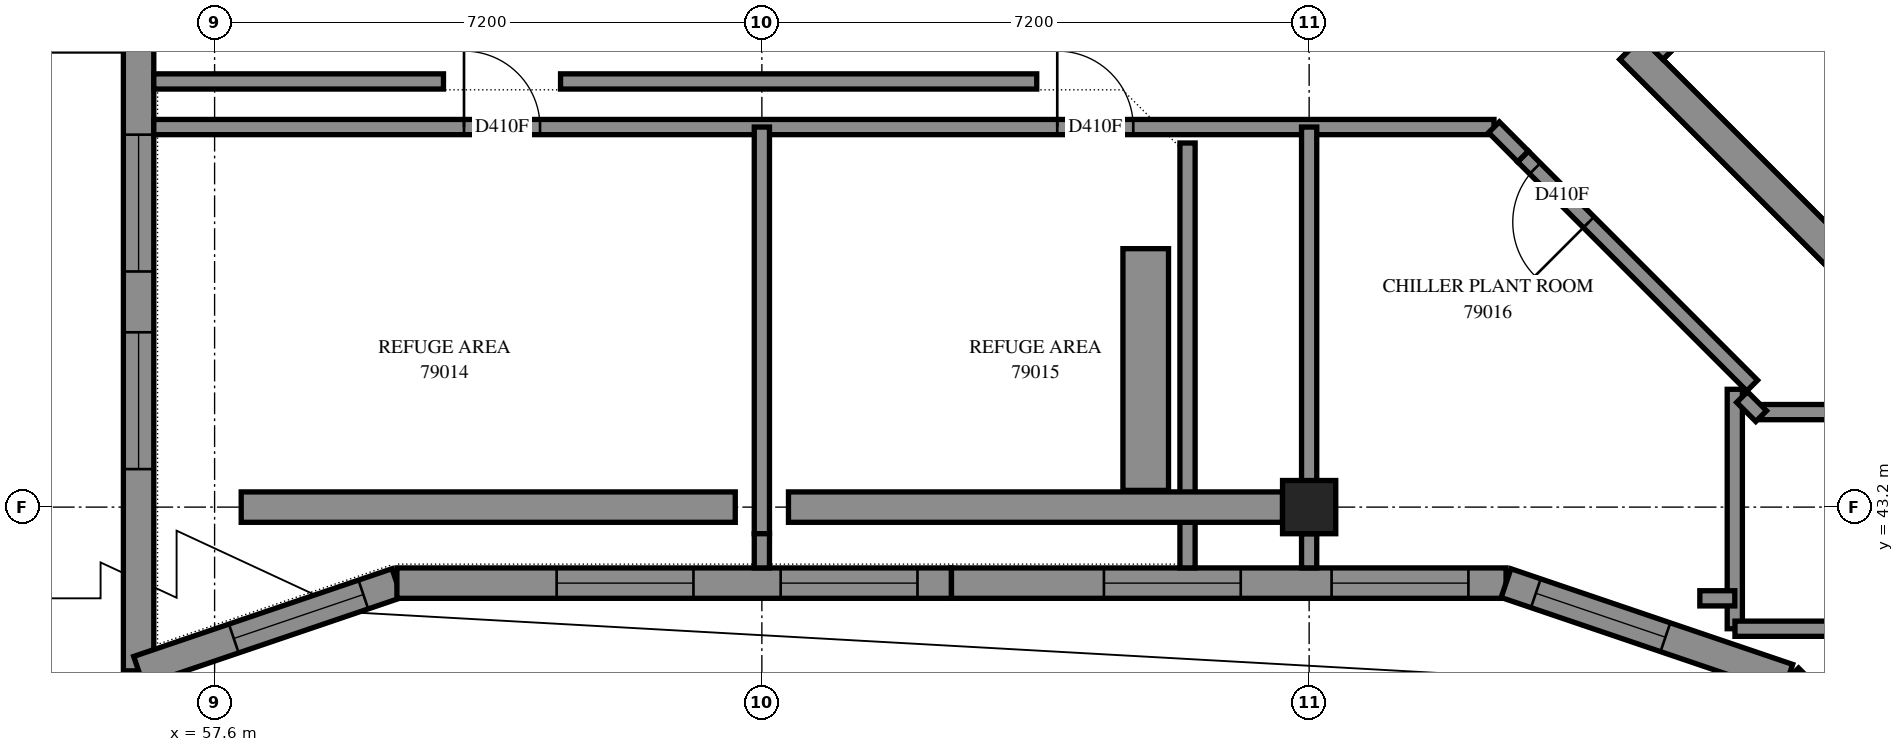
"""IFC4 building model, lengths in metres.
Left out: names, types, materials, properties, quantities, classifications, styles, units other than length and angle.
Written with IfcOpenShell. Run it as: python <this file> out.ifc"""

import sys

from ifc_helpers import new_model, si_unit, direction, frame, frame_2d, origin, origin_2d, place, context, subcontext, project, spatial, polyline, rectangle, outline, extrude, element, fill, save


model = new_model("IFC4")
c1 = context("Model", 3, precision=1e-05, world=origin(), true_north=direction((0.0, 1.0)))
c2 = subcontext(c1, "Body", "Model", "MODEL_VIEW")
j1 = project(units=[si_unit("LENGTHUNIT", "METRE"), si_unit("PLANEANGLEUNIT", "RADIAN")], contexts=[c1])
p1 = place(None, origin())
s1 = spatial("IfcSite", under=j1, at=p1, CompositionType="ELEMENT")
p2 = place(p1, origin())
s2 = spatial("IfcBuilding", under=s1, at=p2, CompositionType="ELEMENT")
p3 = place(p2, frame((0.0, 0.0, 290.6)))
s3 = spatial("IfcBuildingStorey", under=s2, at=p3, CompositionType="ELEMENT", Elevation=290.6)
p4 = place(p3, frame((72.0, 43.2, 0.0), z_axis=(0.0, 0.0, 1.0), x_axis=(1.0, 0.0, 0.0)))
e1 = element("IfcColumn", 1, at=p4, inside=s3, PredefinedType="COLUMN", context=c2, shape_type="SweptSolid", body=[
    extrude(rectangle(XDim=0.7, YDim=0.7, at=origin_2d()), origin(), (0.0, 0.0, 1.0), 3.5),
])
p5 = place(p3, frame((76.23, 49.231, -0.3), z_axis=(0.0, 0.0, 1.0), x_axis=(0.7071034917, -0.7071100706, 0.0)))
e2 = element("IfcWall", 2, at=p5, inside=s3, PredefinedType="SHEAR", context=c2, shape_type="SweptSolid", body=[
    extrude(rectangle(XDim=15.2, YDim=0.4, at=frame_2d((7.6, 0.0))), origin(), (0.0, 0.0, 1.0), 3.1),
])
p6 = place(p3, frame((76.513, 49.231, -0.3), z_axis=(0.0, 0.0, 1.0), x_axis=(0.7071067812, 0.7071067812, 0.0)))
e3 = element("IfcWall", 3, at=p6, inside=s3, PredefinedType="SHEAR", context=c2, shape_type="SweptSolid", body=[
    extrude(rectangle(XDim=14.4, YDim=0.4, at=frame_2d((7.2, 0.0))), origin(), (0.0, 0.0, 1.0), 3.1),
])
p7 = place(p6, frame((4.55, 0.0, 0.3)))
e4 = element("IfcOpeningElement", 4, at=p7, cuts=e3, PredefinedType="OPENING", context=c2, shape_type="SweptSolid", body=[
    extrude(rectangle(XDim=1.1, YDim=2.1, at=frame_2d((0.55, 1.05))), frame((0.0, 0.21, 0.0), z_axis=(0.0, -1.0, 0.0), x_axis=(1.0, 0.0, 0.0)), (0.0, 0.0, 1.0), 0.42),
])
p8 = place(p6, frame((11.35, 0.0, 0.3)))
e5 = element("IfcOpeningElement", 5, at=p8, cuts=e3, PredefinedType="OPENING", context=c2, shape_type="SweptSolid", body=[
    extrude(rectangle(XDim=1.1, YDim=2.1, at=frame_2d((0.55, 1.05))), frame((0.0, 0.21, 0.0), z_axis=(0.0, -1.0, 0.0), x_axis=(1.0, 0.0, 0.0)), (0.0, 0.0, 1.0), 0.42),
])
p9 = place(p3, frame((56.6, 49.4, 0.0), z_axis=(0.0, 0.0, 1.0), x_axis=(0.0, -1.0, 0.0)))
e6 = element("IfcWall", 6, at=p9, inside=s3, PredefinedType="SOLIDWALL", context=c2, shape_type="SweptSolid", body=[
    extrude(outline(polyline([(0.2, -0.2), (8.633, -0.2), (8.075, 0.2), (-0.2, 0.2), (0.2, -0.2)])), origin(), (0.0, 0.0, 1.0), 3.5),
])
p10 = place(p9, frame((1.3, 0.0, 0.7)))
e7 = element("IfcOpeningElement", 7, at=p10, cuts=e6, PredefinedType="OPENING", context=c2, shape_type="SweptSolid", body=[
    extrude(rectangle(XDim=1.8, YDim=2.2, at=frame_2d((0.9, 1.1))), frame((0.0, 0.21, 0.0), z_axis=(0.0, -1.0, 0.0), x_axis=(1.0, 0.0, 0.0)), (0.0, 0.0, 1.0), 0.42),
])
p11 = place(p9, frame((3.9, 0.0, 0.7)))
e8 = element("IfcOpeningElement", 8, at=p11, cuts=e6, PredefinedType="OPENING", context=c2, shape_type="SweptSolid", body=[
    extrude(rectangle(XDim=1.8, YDim=2.2, at=frame_2d((0.9, 1.1))), frame((0.0, 0.21, 0.0), z_axis=(0.0, -1.0, 0.0), x_axis=(1.0, 0.0, 0.0)), (0.0, 0.0, 1.0), 0.42),
])
p12 = place(p3, frame((56.6, 41.046, 0.0), z_axis=(0.0, 0.0, 1.0), x_axis=(0.9469076784, 0.3215055966, 0.0)))
e9 = element("IfcWall", 9, at=p12, inside=s3, PredefinedType="SOLIDWALL", context=c2, shape_type="SweptSolid", body=[
    extrude(outline(polyline([(-0.279, -0.2), (3.556, -0.2), (3.622, 0.2), (0.279, 0.2), (-0.279, -0.2)])), origin(), (0.0, 0.0, 1.0), 3.5),
])
p13 = place(p12, frame((1.323, 0.0, 0.7)))
e10 = element("IfcOpeningElement", 10, at=p13, cuts=e9, PredefinedType="OPENING", context=c2, shape_type="SweptSolid", body=[
    extrude(rectangle(XDim=1.8, YDim=2.2, at=frame_2d((0.9, 1.1))), frame((0.0, 0.21, 0.0), z_axis=(0.0, -1.0, 0.0), x_axis=(1.0, 0.0, 0.0)), (0.0, 0.0, 1.0), 0.42),
])
p14 = place(p3, frame((59.998, 42.2, 0.0), z_axis=(0.0, 0.0, 1.0), x_axis=(1.0, 0.0, 0.0)))
e11 = element("IfcWall", 11, at=p14, inside=s3, PredefinedType="SOLIDWALL", context=c2, shape_type="SweptSolid", body=[
    extrude(outline(polyline([(0.033, -0.2), (7.296, -0.2), (7.296, 0.2), (-0.033, 0.2), (0.033, -0.2)])), origin(), (0.0, 0.0, 1.0), 3.5),
])
p15 = place(p14, frame((2.102, 0.0, 0.7)))
e12 = element("IfcOpeningElement", 12, at=p15, cuts=e11, PredefinedType="OPENING", context=c2, shape_type="SweptSolid", body=[
    extrude(rectangle(XDim=1.8, YDim=2.2, at=frame_2d((0.9, 1.1))), frame((0.0, 0.21, 0.0), z_axis=(0.0, -1.0, 0.0), x_axis=(1.0, 0.0, 0.0)), (0.0, 0.0, 1.0), 0.42),
])
p16 = place(p14, frame((5.049, 0.0, 0.7)))
e13 = element("IfcOpeningElement", 13, at=p16, cuts=e11, PredefinedType="OPENING", context=c2, shape_type="SweptSolid", body=[
    extrude(rectangle(XDim=1.8, YDim=2.2, at=frame_2d((0.9, 1.1))), frame((0.0, 0.21, 0.0), z_axis=(0.0, -1.0, 0.0), x_axis=(1.0, 0.0, 0.0)), (0.0, 0.0, 1.0), 0.42),
])
p17 = place(p3, frame((67.294, 42.2, 0.0), z_axis=(0.0, 0.0, 1.0), x_axis=(1.0, 0.0, 0.0)))
e14 = element("IfcWall", 14, at=p17, inside=s3, PredefinedType="SOLIDWALL", context=c2, shape_type="SweptSolid", body=[
    extrude(outline(polyline([(0.0, -0.2), (7.263, -0.2), (7.329, 0.2), (0.0, 0.2), (0.0, -0.2)])), origin(), (0.0, 0.0, 1.0), 3.5),
])
p18 = place(p17, frame((2.006, 0.0, 0.7)))
e15 = element("IfcOpeningElement", 15, at=p18, cuts=e14, PredefinedType="OPENING", context=c2, shape_type="SweptSolid", body=[
    extrude(rectangle(XDim=1.8, YDim=2.2, at=frame_2d((0.9, 1.1))), frame((0.0, 0.21, 0.0), z_axis=(0.0, -1.0, 0.0), x_axis=(1.0, 0.0, 0.0)), (0.0, 0.0, 1.0), 0.42),
])
p19 = place(p17, frame((5.001, 0.0, 0.7)))
e16 = element("IfcOpeningElement", 16, at=p19, cuts=e14, PredefinedType="OPENING", context=c2, shape_type="SweptSolid", body=[
    extrude(rectangle(XDim=1.8, YDim=2.2, at=frame_2d((0.9, 1.1))), frame((0.0, 0.21, 0.0), z_axis=(0.0, -1.0, 0.0), x_axis=(1.0, 0.0, 0.0)), (0.0, 0.0, 1.0), 0.42),
])
p20 = place(p3, frame((74.59, 42.2, 0.0), z_axis=(0.0, 0.0, 1.0), x_axis=(0.9469112296, -0.3214951372, 0.0)))
e17 = element("IfcWall", 17, at=p20, inside=s3, PredefinedType="SOLIDWALL", context=c2, shape_type="SweptSolid", body=[
    extrude(outline(polyline([(0.033, -0.2), (3.868, -0.2), (3.961, 0.2), (-0.033, 0.2), (0.033, -0.2)])), origin(), (0.0, 0.0, 1.0), 3.5),
])
p21 = place(p20, frame((0.414, 0.0, 0.7)))
e18 = element("IfcOpeningElement", 18, at=p21, cuts=e17, PredefinedType="OPENING", context=c2, shape_type="SweptSolid", body=[
    extrude(rectangle(XDim=1.8, YDim=2.2, at=frame_2d((0.9, 1.1))), frame((0.0, 0.21, 0.0), z_axis=(0.0, -1.0, 0.0), x_axis=(1.0, 0.0, 0.0)), (0.0, 0.0, 1.0), 0.42),
])
p22 = place(p3, frame((78.297, 40.941, 0.0), z_axis=(0.0, 0.0, 1.0), x_axis=(0.7071035917, -0.7071099707, 0.0)))
e19 = element("IfcWall", 19, at=p22, inside=s3, PredefinedType="SOLIDWALL", context=c2, shape_type="SweptSolid", body=[
    extrude(outline(polyline([(0.047, -0.2), (15.877, -0.2), (15.476, 0.2), (-0.047, 0.2), (0.047, -0.2)])), origin(), (0.0, 0.0, 1.0), 3.5),
])
p23 = place(p22, frame((1.138, 0.0, 0.7)))
e20 = element("IfcOpeningElement", 20, at=p23, cuts=e19, PredefinedType="OPENING", context=c2, shape_type="SweptSolid", body=[
    extrude(rectangle(XDim=1.8, YDim=2.2, at=frame_2d((0.9, 1.1))), frame((0.0, 0.21, 0.0), z_axis=(0.0, -1.0, 0.0), x_axis=(1.0, 0.0, 0.0)), (0.0, 0.0, 1.0), 0.42),
])
p24 = place(p22, frame((4.777, 0.0, 0.7)))
e21 = element("IfcOpeningElement", 21, at=p24, cuts=e19, PredefinedType="OPENING", context=c2, shape_type="SweptSolid", body=[
    extrude(rectangle(XDim=1.8, YDim=2.2, at=frame_2d((0.9, 1.1))), frame((0.0, 0.21, 0.0), z_axis=(0.0, -1.0, 0.0), x_axis=(1.0, 0.0, 0.0)), (0.0, 0.0, 1.0), 0.42),
])
p25 = place(p22, frame((8.377, 0.0, 0.7)))
e22 = element("IfcOpeningElement", 22, at=p25, cuts=e19, PredefinedType="OPENING", context=c2, shape_type="SweptSolid", body=[
    extrude(rectangle(XDim=1.8, YDim=2.2, at=frame_2d((0.9, 1.1))), frame((0.0, 0.21, 0.0), z_axis=(0.0, -1.0, 0.0), x_axis=(1.0, 0.0, 0.0)), (0.0, 0.0, 1.0), 0.42),
])
p26 = place(p22, frame((11.976, 0.0, 0.7)))
e23 = element("IfcOpeningElement", 23, at=p26, cuts=e19, PredefinedType="OPENING", context=c2, shape_type="SweptSolid", body=[
    extrude(rectangle(XDim=1.8, YDim=2.2, at=frame_2d((0.9, 1.1))), frame((0.0, 0.21, 0.0), z_axis=(0.0, -1.0, 0.0), x_axis=(1.0, 0.0, 0.0)), (0.0, 0.0, 1.0), 0.42),
])
p27 = place(p3, frame((70.4, 42.4, 0.0), z_axis=(0.0, 0.0, 1.0), x_axis=(0.0, 1.0, 0.0)))
e24 = element("IfcWall", 24, at=p27, inside=s3, PredefinedType="PARAPET", context=c2, shape_type="SweptSolid", body=[
    extrude(outline(polyline([(0.0, -0.1), (5.632, -0.1), (5.549, 0.1), (0.0, 0.1), (0.0, -0.1)])), origin(), (0.0, 0.0, 1.0), 0.25),
])
p28 = place(p3, frame((56.8, 48.2, 0.0), z_axis=(0.0, 0.0, 1.0), x_axis=(1.0, 0.0, 0.0)))
e25 = element("IfcWall", 25, at=p28, inside=s3, PredefinedType="PARTITIONING", context=c2, shape_type="SweptSolid", body=[
    extrude(rectangle(XDim=17.632, YDim=0.2, at=frame_2d((8.816, 0.0))), origin(), (0.0, 0.0, 1.0), 3.5),
])
p29 = place(p28, frame((4.081, 0.0, 0.0)))
e26 = element("IfcOpeningElement", 26, at=p29, cuts=e25, PredefinedType="OPENING", context=c2, shape_type="SweptSolid", body=[
    extrude(rectangle(XDim=1.0, YDim=2.1, at=frame_2d((0.5, 1.05))), frame((0.0, 0.11, 0.0), z_axis=(0.0, -1.0, 0.0), x_axis=(1.0, 0.0, 0.0)), (0.0, 0.0, 1.0), 0.22),
])
p30 = place(p28, frame((11.886, 0.0, 0.0)))
e27 = element("IfcOpeningElement", 27, at=p30, cuts=e25, PredefinedType="OPENING", context=c2, shape_type="SweptSolid", body=[
    extrude(rectangle(XDim=1.0, YDim=2.1, at=frame_2d((0.5, 1.05))), frame((0.0, 0.11, 0.0), z_axis=(0.0, -1.0, 0.0), x_axis=(1.0, 0.0, 0.0)), (0.0, 0.0, 1.0), 0.22),
])
p31 = place(p3, frame((64.8, 42.85, 0.0), z_axis=(0.0, 0.0, 1.0), x_axis=(0.0, 1.0, 0.0)))
e28 = element("IfcWall", 28, at=p31, inside=s3, PredefinedType="PARTITIONING", context=c2, shape_type="SweptSolid", body=[
    extrude(rectangle(XDim=5.35, YDim=0.2, at=frame_2d((2.675, 0.0))), origin(), (0.0, 0.0, 1.0), 3.5),
])
p32 = place(p3, frame((72.0, 42.85, 0.0), z_axis=(0.0, 0.0, 1.0), x_axis=(0.0, 1.0, 0.0)))
e29 = element("IfcWall", 29, at=p32, inside=s3, PredefinedType="PARTITIONING", context=c2, shape_type="SweptSolid", body=[
    extrude(rectangle(XDim=5.35, YDim=0.2, at=frame_2d((2.675, 0.0))), origin(), (0.0, 0.0, 1.0), 3.0),
])
p33 = place(p3, frame((77.829, 44.799, 0.0), z_axis=(0.0, 0.0, 1.0), x_axis=(-0.7072005868, 0.7070129631, 0.0)))
e30 = element("IfcWall", 30, at=p33, inside=s3, PredefinedType="PARTITIONING", context=c2, shape_type="SweptSolid", body=[
    extrude(rectangle(XDim=4.264, YDim=0.2, at=frame_2d((2.132, 0.0))), origin(), (0.0, 0.0, 1.0), 3.5),
])
p34 = place(p33, frame((3.04, 0.0, 0.0)))
e31 = element("IfcOpeningElement", 31, at=p34, cuts=e30, PredefinedType="OPENING", context=c2, shape_type="SweptSolid", body=[
    extrude(rectangle(XDim=1.0, YDim=2.1, at=frame_2d((0.5, 1.05))), frame((0.0, 0.11, 0.0), z_axis=(0.0, -1.0, 0.0), x_axis=(1.0, 0.0, 0.0)), (0.0, 0.0, 1.0), 0.22),
])
p35 = place(p3, frame((77.6, 41.6, 0.0), z_axis=(0.0, 0.0, 1.0), x_axis=(0.0, 1.0, 0.0)))
e32 = element("IfcWall", 32, at=p35, inside=s3, PredefinedType="PARTITIONING", context=c2, shape_type="SweptSolid", body=[
    extrude(rectangle(XDim=3.15, YDim=0.2, at=frame_2d((1.575, 0.0))), origin(), (0.0, 0.0, 1.0), 3.0),
])
p36 = place(p3, frame((77.602, 41.6, 0.0), z_axis=(0.0, 0.0, 1.0), x_axis=(1.0, 0.0, 0.0)))
e33 = element("IfcWall", 33, at=p36, inside=s3, PredefinedType="PARTITIONING", context=c2, shape_type="SweptSolid", body=[
    extrude(rectangle(XDim=3.148, YDim=0.2, at=frame_2d((1.574, 0.0))), origin(), (0.0, 0.0, 1.0), 3.5),
])
p37 = place(p3, frame((77.952, 44.45, 0.0), z_axis=(0.0, 0.0, 1.0), x_axis=(1.0, 0.0, 0.0)))
e34 = element("IfcWall", 34, at=p37, inside=s3, PredefinedType="PARTITIONING", context=c2, shape_type="SweptSolid", body=[
    extrude(rectangle(XDim=2.498, YDim=0.2, at=frame_2d((1.249, 0.0))), origin(), (0.0, 0.0, 1.0), 3.5),
])
p38 = place(p3, frame((74.431, 48.198, 0.0), z_axis=(0.0, 0.0, 1.0), x_axis=(0.7052581455, -0.7089505965, 0.0)))
e35 = element("IfcWall", 35, at=p38, inside=s3, PredefinedType="PARTITIONING", context=c2, shape_type="SweptSolid", body=[
    extrude(rectangle(XDim=0.542, YDim=0.2, at=frame_2d((0.271, 0.0))), origin(), (0.0, 0.0, 1.0), 3.5),
])
p39 = place(p3, frame((77.696, 44.648, 0.0), z_axis=(0.0, 0.0, 1.0), x_axis=(0.7071067812, -0.7071067812, 0.0)))
e36 = element("IfcWall", 36, at=p39, inside=s3, PredefinedType="PARTITIONING", context=c2, shape_type="SweptSolid", body=[
    extrude(rectangle(XDim=0.355, YDim=0.2, at=frame_2d((0.177, 0.0))), origin(), (0.0, 0.0, 1.0), 3.5),
])
p40 = place(p3, frame((77.14, 42.0, 0.0), z_axis=(0.0, 0.0, 1.0), x_axis=(1.0, 0.0, 0.0)))
e37 = element("IfcWall", 37, at=p40, inside=s3, PredefinedType="PARTITIONING", context=c2, shape_type="SweptSolid", body=[
    extrude(rectangle(XDim=0.46, YDim=0.2, at=frame_2d((0.23, 0.0))), origin(), (0.0, 0.0, 1.0), 3.5),
])
p41 = place(p3, frame((68.416, 48.8, 0.0), z_axis=(0.0, 0.0, 1.0), x_axis=(-1.0, 0.0, 0.0)))
e38 = element("IfcWall", 38, at=p41, inside=s3, PredefinedType="PARAPET", context=c2, shape_type="SweptSolid", body=[
    extrude(outline(polyline([(0.0, -0.1), (6.265, -0.1), (6.265, 0.1), (0.0, 0.1), (0.0, -0.1)])), origin(), (0.0, 0.0, 1.0), 0.25),
])
p42 = place(p3, frame((60.611, 48.8, 0.0), z_axis=(0.0, 0.0, 1.0), x_axis=(-1.0, 0.0, 0.0)))
e39 = element("IfcWall", 39, at=p42, inside=s3, PredefinedType="PARAPET", context=c2, shape_type="SweptSolid", body=[
    extrude(outline(polyline([(0.0, -0.1), (3.811, -0.1), (3.811, 0.1), (0.0, 0.1), (0.0, -0.1)])), origin(), (0.0, 0.0, 1.0), 0.25),
])
p43 = place(p3, frame((69.85, 43.42, 0.0), z_axis=(0.0, 0.0, 1.0), x_axis=(0.0, 1.0, 0.0)))
e40 = element("IfcWall", 40, at=p43, inside=s3, PredefinedType="SOLIDWALL", context=c2, shape_type="SweptSolid", body=[
    extrude(outline(polyline([(0.0, -0.3), (3.18, -0.3), (3.18, 0.3), (0.0, 0.3), (0.0, -0.3)])), origin(), (0.0, 0.0, 1.0), 0.65),
])
for number, where, z_axis, x_axis in (
    (41, (64.8, 42.4, 0.0), (0.0, 0.0, 1.0), (0.0, 1.0, 0.0)),
    (42, (72.0, 42.4, 0.0), (0.0, 0.0, 1.0), (0.0, 1.0, 0.0)),
):
    element("IfcWall", number, at=place(p3, frame(where, z_axis=z_axis, x_axis=x_axis)), inside=s3, PredefinedType="PARTITIONING", context=c2, shape_type="SweptSolid", body=[
        extrude(outline(polyline([(0.0, -0.1), (0.45, -0.1), (0.45, 0.1), (0.0, 0.1), (0.0, -0.1)])), origin(), (0.0, 0.0, 1.0), 3.5),
    ])
p44 = place(p10, origin())
e43 = element("IfcWindow", 43, at=p44, inside=s3, PartitioningType="SINGLE_PANEL", PredefinedType="WINDOW", context=c2, shape_type="SweptSolid", body=[
    extrude(rectangle(XDim=1.8, YDim=2.2, at=frame_2d((0.9, 1.1))), frame((0.0, 0.08, 0.0), z_axis=(0.0, -1.0, 0.0), x_axis=(1.0, 0.0, 0.0)), (0.0, 0.0, 1.0), 0.06),
])
fill(e7, e43)
p45 = place(p11, origin())
e44 = element("IfcWindow", 44, at=p45, inside=s3, PartitioningType="SINGLE_PANEL", PredefinedType="WINDOW", context=c2, shape_type="SweptSolid", body=[
    extrude(rectangle(XDim=1.8, YDim=2.2, at=frame_2d((0.9, 1.1))), frame((0.0, 0.08, 0.0), z_axis=(0.0, -1.0, 0.0), x_axis=(1.0, 0.0, 0.0)), (0.0, 0.0, 1.0), 0.06),
])
fill(e8, e44)
p46 = place(p13, origin())
e45 = element("IfcWindow", 45, at=p46, inside=s3, PartitioningType="SINGLE_PANEL", PredefinedType="WINDOW", context=c2, shape_type="SweptSolid", body=[
    extrude(rectangle(XDim=1.8, YDim=2.2, at=frame_2d((0.9, 1.1))), frame((0.0, 0.08, 0.0), z_axis=(0.0, -1.0, 0.0), x_axis=(1.0, 0.0, 0.0)), (0.0, 0.0, 1.0), 0.06),
])
fill(e10, e45)
p47 = place(p15, origin())
e46 = element("IfcWindow", 46, at=p47, inside=s3, PartitioningType="SINGLE_PANEL", PredefinedType="WINDOW", context=c2, shape_type="SweptSolid", body=[
    extrude(rectangle(XDim=1.8, YDim=2.2, at=frame_2d((0.9, 1.1))), frame((0.0, 0.08, 0.0), z_axis=(0.0, -1.0, 0.0), x_axis=(1.0, 0.0, 0.0)), (0.0, 0.0, 1.0), 0.06),
])
fill(e12, e46)
p48 = place(p16, origin())
e47 = element("IfcWindow", 47, at=p48, inside=s3, PartitioningType="SINGLE_PANEL", PredefinedType="WINDOW", context=c2, shape_type="SweptSolid", body=[
    extrude(rectangle(XDim=1.8, YDim=2.2, at=frame_2d((0.9, 1.1))), frame((0.0, 0.08, 0.0), z_axis=(0.0, -1.0, 0.0), x_axis=(1.0, 0.0, 0.0)), (0.0, 0.0, 1.0), 0.06),
])
fill(e13, e47)
p49 = place(p18, origin())
e48 = element("IfcWindow", 48, at=p49, inside=s3, PartitioningType="SINGLE_PANEL", PredefinedType="WINDOW", context=c2, shape_type="SweptSolid", body=[
    extrude(rectangle(XDim=1.8, YDim=2.2, at=frame_2d((0.9, 1.1))), frame((0.0, 0.08, 0.0), z_axis=(0.0, -1.0, 0.0), x_axis=(1.0, 0.0, 0.0)), (0.0, 0.0, 1.0), 0.06),
])
fill(e15, e48)
p50 = place(p19, origin())
e49 = element("IfcWindow", 49, at=p50, inside=s3, PartitioningType="SINGLE_PANEL", PredefinedType="WINDOW", context=c2, shape_type="SweptSolid", body=[
    extrude(rectangle(XDim=1.8, YDim=2.2, at=frame_2d((0.9, 1.1))), frame((0.0, 0.08, 0.0), z_axis=(0.0, -1.0, 0.0), x_axis=(1.0, 0.0, 0.0)), (0.0, 0.0, 1.0), 0.06),
])
fill(e16, e49)
p51 = place(p29, origin())
e50 = element("IfcDoor", 50, at=p51, inside=s3, OperationType="SINGLE_SWING_LEFT", PredefinedType="DOOR", context=c2, shape_type="SweptSolid", body=[
    extrude(rectangle(XDim=1.0, YDim=2.1, at=frame_2d((0.5, 1.05))), frame((0.0, 0.025, 0.0), z_axis=(0.0, -1.0, 0.0), x_axis=(1.0, 0.0, 0.0)), (0.0, 0.0, 1.0), 0.05),
])
fill(e26, e50)
p52 = place(p30, origin())
e51 = element("IfcDoor", 51, at=p52, inside=s3, OperationType="SINGLE_SWING_LEFT", PredefinedType="DOOR", context=c2, shape_type="SweptSolid", body=[
    extrude(rectangle(XDim=1.0, YDim=2.1, at=frame_2d((0.5, 1.05))), frame((0.0, 0.025, 0.0), z_axis=(0.0, -1.0, 0.0), x_axis=(1.0, 0.0, 0.0)), (0.0, 0.0, 1.0), 0.05),
])
fill(e27, e51)
p53 = place(p34, origin())
e52 = element("IfcDoor", 52, at=p53, inside=s3, OperationType="SINGLE_SWING_LEFT", PredefinedType="DOOR", context=c2, shape_type="SweptSolid", body=[
    extrude(rectangle(XDim=1.0, YDim=2.1, at=frame_2d((0.5, 1.05))), frame((0.0, 0.025, 0.0), z_axis=(0.0, -1.0, 0.0), x_axis=(1.0, 0.0, 0.0)), (0.0, 0.0, 1.0), 0.05),
])
fill(e31, e52)
p54 = place(p21, origin())
e53 = element("IfcWindow", 53, at=p54, inside=s3, PartitioningType="SINGLE_PANEL", PredefinedType="WINDOW", context=c2, shape_type="SweptSolid", body=[
    extrude(rectangle(XDim=1.8, YDim=2.2, at=frame_2d((0.9, 1.1))), frame((0.0, 0.08, 0.0), z_axis=(0.0, -1.0, 0.0), x_axis=(1.0, 0.0, 0.0)), (0.0, 0.0, 1.0), 0.06),
])
fill(e18, e53)
save(model, sys.argv[1])
